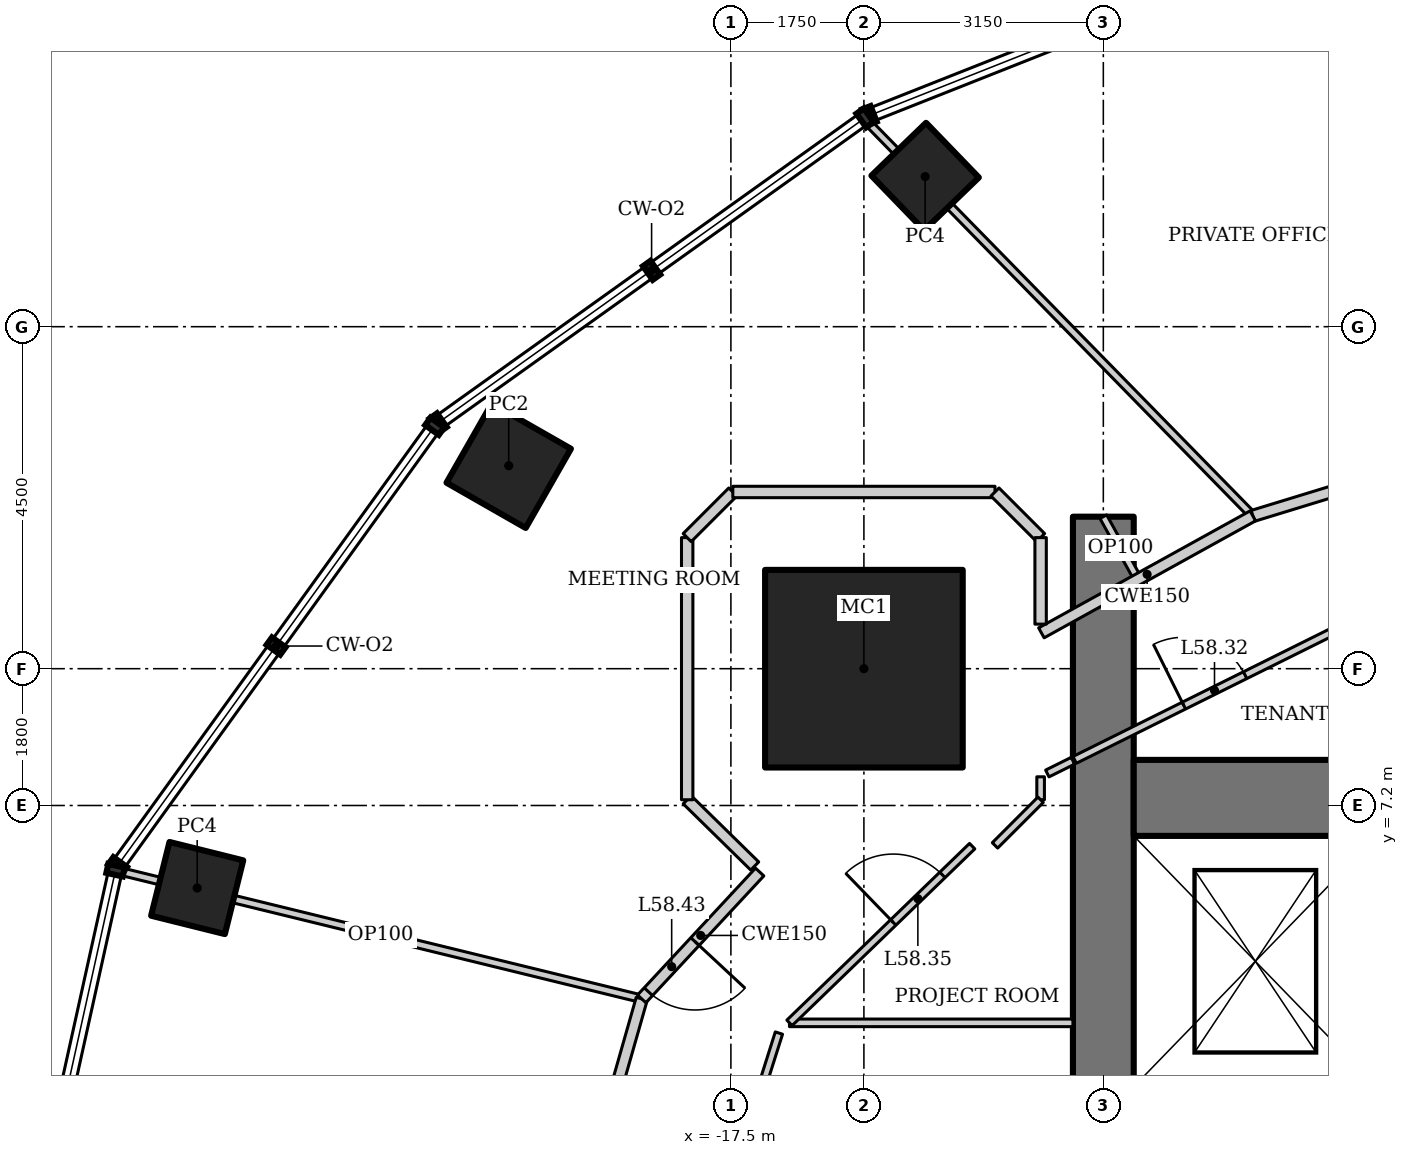
"""IFC4 building model, lengths in metres.
Left out: names, types, materials, properties, quantities, classifications, styles, units other than length and angle.
Written with IfcOpenShell. Run it as: python <this file> out.ifc"""

import sys

from ifc_helpers import new_model, si_unit, direction, frame, frame_2d, origin, origin_2d, place, context, subcontext, project, spatial, rectangle, hollow_rectangle, extrude, element, fill, save


model = new_model("IFC4")
c1 = context("Model", 3, precision=1e-05, world=origin(), true_north=direction((0.0, 1.0)))
c2 = subcontext(c1, "Body", "Model", "MODEL_VIEW")
j1 = project(units=[si_unit("LENGTHUNIT", "METRE"), si_unit("PLANEANGLEUNIT", "RADIAN")], contexts=[c1])
p1 = place(None, origin())
s1 = spatial("IfcSite", under=j1, at=p1, CompositionType="ELEMENT")
p2 = place(p1, origin())
s2 = spatial("IfcBuilding", under=s1, at=p2, CompositionType="ELEMENT")
p3 = place(p2, frame((0.0, 0.0, 249.4)))
s3 = spatial("IfcBuildingStorey", under=s2, at=p3, CompositionType="ELEMENT", Elevation=249.4)
p4 = place(p3, frame((-15.75, 9.0, 0.0), z_axis=(0.0, 0.0, 1.0), x_axis=(1.0, 0.0, 0.0)))
e1 = element("IfcColumn", 1, at=p4, inside=s3, PredefinedType="COLUMN", context=c2, shape_type="SweptSolid", body=[
    extrude(hollow_rectangle(XDim=2.6, YDim=2.6, WallThickness=0.13, at=origin_2d()), origin(), (0.0, 0.0, 1.0), 4.2),
])
for number, where, z_axis, x_axis in (
    (2, (-9.035, 17.731, 0.0), (0.0, 0.0, 1.0), (0.891, 0.454, 0.0)),
    (3, (-14.944, 15.475, 0.0), (0.0, 0.0, 1.0), (0.719, 0.695, 0.0)),
):
    element("IfcColumn", number, at=place(p3, frame(where, z_axis=z_axis, x_axis=x_axis)), inside=s3, PredefinedType="COLUMN", context=c2, shape_type="SweptSolid", body=[
        extrude(hollow_rectangle(XDim=1.0, YDim=1.0, WallThickness=0.08, at=origin_2d()), origin(), (0.0, 0.0, 1.0), 4.2),
    ])
p5 = place(p3, frame((-20.423, 11.67, 0.0), z_axis=(0.0, 0.0, 1.0), x_axis=(0.496139221777, 0.86824298017, 0.0)))
e4 = element("IfcColumn", 4, at=p5, inside=s3, PredefinedType="COLUMN", context=c2, shape_type="SweptSolid", body=[
    extrude(hollow_rectangle(XDim=1.2, YDim=1.2, WallThickness=0.1, at=origin_2d()), origin(), (0.0, 0.0, 1.0), 4.2),
])
p6 = place(p3, frame((-24.522, 6.114, 0.0), z_axis=(0.0, 0.0, 1.0), x_axis=(0.2419218956, 0.970295726276, 0.0)))
e5 = element("IfcColumn", 5, at=p6, inside=s3, PredefinedType="COLUMN", context=c2, shape_type="SweptSolid", body=[
    extrude(hollow_rectangle(XDim=1.0, YDim=1.0, WallThickness=0.08, at=origin_2d()), origin(), (0.0, 0.0, 1.0), 4.2),
])
p7 = place(p3, frame((-12.6, 11.0, 0.0), z_axis=(0.0, 0.0, 1.0), x_axis=(0.0, -1.0, 0.0)))
e6 = element("IfcWall", 6, at=p7, inside=s3, PredefinedType="SHEAR", context=c2, shape_type="SweptSolid", body=[
    extrude(rectangle(XDim=22.0, YDim=0.8, at=frame_2d((11.0, 0.0))), origin(), (0.0, 0.0, 1.0), 4.2),
])
p8 = place(p7, frame((10.1, 0.0, 0.0)))
e7 = element("IfcOpeningElement", 7, at=p8, cuts=e6, PredefinedType="OPENING", context=c2, shape_type="SweptSolid", body=[
    extrude(rectangle(XDim=1.8, YDim=2.1, at=frame_2d((0.9, 1.05))), frame((0.0, 0.41, 0.0), z_axis=(0.0, -1.0, 0.0), x_axis=(1.0, 0.0, 0.0)), (0.0, 0.0, 1.0), 0.82),
])
p9 = place(p3, frame((-5.6, 7.3, 0.0), z_axis=(0.0, 0.0, 1.0), x_axis=(-1.0, 0.0, 0.0)))
e8 = element("IfcWall", 8, at=p9, inside=s3, PredefinedType="SHEAR", context=c2, shape_type="SweptSolid", body=[
    extrude(rectangle(XDim=6.6, YDim=1.0, at=frame_2d((3.3, 0.0))), origin(), (0.0, 0.0, 1.0), 4.2),
])
p10 = place(p3, frame((-15.709, 16.199, 0.0), z_axis=(0.0, 0.0, 1.0), x_axis=(0.699362525935, -0.714767135029, 0.0)))
e9 = element("IfcWall", 9, at=p10, inside=s3, PredefinedType="PARTITIONING", context=c2, shape_type="SweptSolid", body=[
    extrude(rectangle(XDim=7.259, YDim=0.1, at=frame_2d((3.629, 0.0))), origin(), (0.0, 0.0, 1.0), 3.41),
])
p11 = place(p3, frame((-25.543, 6.335, 0.0), z_axis=(0.0, 0.0, 1.0), x_axis=(0.971384494438, -0.237512450129, 0.0)))
e10 = element("IfcWall", 10, at=p11, inside=s3, PredefinedType="PARTITIONING", context=c2, shape_type="SweptSolid", body=[
    extrude(rectangle(XDim=7.072, YDim=0.1, at=frame_2d((3.536, 0.0))), origin(), (0.0, 0.0, 1.0), 3.108),
])
p12 = place(p3, frame((-6.288, 12.341, 0.0), z_axis=(0.0, 0.0, 1.0), x_axis=(-0.956185837153, -0.292760388079, 0.0)))
e11 = element("IfcWall", 11, at=p12, inside=s3, PredefinedType="PARTITIONING", context=c2, shape_type="SweptSolid", body=[
    extrude(rectangle(XDim=4.544, YDim=0.15, at=frame_2d((2.272, 0.0))), origin(), (0.0, 0.0, 1.0), 4.05),
])
p13 = place(p12, frame((0.15, 0.0, 0.0)))
e12 = element("IfcOpeningElement", 12, at=p13, cuts=e11, PredefinedType="OPENING", context=c2, shape_type="SweptSolid", body=[
    extrude(rectangle(XDim=0.9, YDim=2.1, at=frame_2d((0.45, 1.05))), frame((0.0, 0.085, 0.0), z_axis=(0.0, -1.0, 0.0), x_axis=(1.0, 0.0, 0.0)), (0.0, 0.0, 1.0), 0.17),
])
p14 = place(p3, frame((-12.977, 7.8, 0.0), z_axis=(0.0, 0.0, 1.0), x_axis=(0.895529831139, 0.445001484874, 0.0)))
e13 = element("IfcWall", 13, at=p14, inside=s3, PredefinedType="PARTITIONING", context=c2, shape_type="SweptSolid", body=[
    extrude(rectangle(XDim=4.108, YDim=0.1, at=frame_2d((2.054, 0.0))), origin(), (0.0, 0.0, 1.0), 4.05),
])
p15 = place(p14, frame((1.604, 0.0, 0.0)))
e14 = element("IfcOpeningElement", 14, at=p15, cuts=e13, PredefinedType="OPENING", context=c2, shape_type="SweptSolid", body=[
    extrude(rectangle(XDim=0.9, YDim=2.1, at=frame_2d((0.45, 1.05))), frame((0.0, 0.06, 0.0), z_axis=(0.0, -1.0, 0.0), x_axis=(1.0, 0.0, 0.0)), (0.0, 0.0, 1.0), 0.12),
])
p16 = place(p3, frame((-16.729, 4.34, 0.0), z_axis=(0.0, 0.0, 1.0), x_axis=(1.0, 0.0, 0.0)))
e15 = element("IfcWall", 15, at=p16, inside=s3, PredefinedType="PARTITIONING", context=c2, shape_type="SweptSolid", body=[
    extrude(rectangle(XDim=3.729, YDim=0.1, at=frame_2d((1.865, 0.0))), origin(), (0.0, 0.0, 1.0), 4.05),
])
p17 = place(p3, frame((-13.337, 7.621, 0.0), z_axis=(0.0, 0.0, 1.0), x_axis=(0.895721570004, 0.444615416995, 0.0)))
e16 = element("IfcWall", 16, at=p17, inside=s3, PredefinedType="PARTITIONING", context=c2, shape_type="SweptSolid", body=[
    extrude(rectangle(XDim=0.376, YDim=0.1, at=frame_2d((0.188, 0.0))), origin(), (0.0, 0.0, 1.0), 4.05),
])
p18 = place(p3, frame((-12.6, 11.0, 0.0), z_axis=(0.0, 0.0, 1.0), x_axis=(0.484103558985, -0.875010710893, 0.0)))
e17 = element("IfcWall", 17, at=p18, inside=s3, PredefinedType="PARTITIONING", context=c2, shape_type="SweptSolid", body=[
    extrude(rectangle(XDim=0.943, YDim=0.1, at=frame_2d((0.472, 0.0))), origin(), (0.0, 0.0, 1.0), 4.05),
])
p19 = place(p3, frame((-18.673, 4.656, 0.0), z_axis=(0.0, 0.0, 1.0), x_axis=(-0.274067949327, -0.961710330168, 0.0)))
e18 = element("IfcWall", 18, at=p19, inside=s3, PredefinedType="PARTITIONING", context=c2, shape_type="SweptSolid", body=[
    extrude(rectangle(XDim=2.567, YDim=0.15, at=frame_2d((1.284, 0.0))), origin(), (0.0, 0.0, 1.0), 4.05),
])
p20 = place(p3, frame((-17.46, 2.335, 0.0), z_axis=(0.0, 0.0, 1.0), x_axis=(0.301821975729, 0.953364303384, 0.0)))
e19 = element("IfcWall", 19, at=p20, inside=s3, PredefinedType="PARTITIONING", context=c2, shape_type="SweptSolid", body=[
    extrude(rectangle(XDim=1.962, YDim=0.1, at=frame_2d((0.981, 0.0))), origin(), (0.0, 0.0, 1.0), 4.05),
])
p21 = place(p3, frame((-10.633, 11.01, 0.0), z_axis=(0.0, 0.0, 1.0), x_axis=(-0.875072100837, -0.483992580869, 0.0)))
e20 = element("IfcWall", 20, at=p21, inside=s3, PredefinedType="PARTITIONING", context=c2, shape_type="SweptSolid", body=[
    extrude(rectangle(XDim=3.179, YDim=0.15, at=frame_2d((1.59, 0.0))), origin(), (0.0, 0.0, 1.0), 4.05),
])
p22 = place(p3, frame((-17.121, 6.325, 0.0), z_axis=(0.0, 0.0, 1.0), x_axis=(-0.680985069419, -0.732297299755, 0.0)))
e21 = element("IfcWall", 21, at=p22, inside=s3, PredefinedType="PARTITIONING", context=c2, shape_type="SweptSolid", body=[
    extrude(rectangle(XDim=2.279, YDim=0.15, at=frame_2d((1.14, 0.0))), origin(), (0.0, 0.0, 1.0), 4.05),
])
p23 = place(p22, frame((1.25, 0.0, 0.0)))
e22 = element("IfcOpeningElement", 22, at=p23, cuts=e21, PredefinedType="OPENING", context=c2, shape_type="SweptSolid", body=[
    extrude(rectangle(XDim=0.9, YDim=2.1, at=frame_2d((0.45, 1.05))), frame((0.0, 0.085, 0.0), z_axis=(0.0, -1.0, 0.0), x_axis=(1.0, 0.0, 0.0)), (0.0, 0.0, 1.0), 0.17),
])
p24 = place(p3, frame((-16.729, 4.34, 0.0), z_axis=(0.0, 0.0, 1.0), x_axis=(0.718798647558, 0.695218314107, 0.0)))
e23 = element("IfcWall", 23, at=p24, inside=s3, PredefinedType="PARTITIONING", context=c2, shape_type="SweptSolid", body=[
    extrude(rectangle(XDim=3.344, YDim=0.1, at=frame_2d((1.672, 0.0))), origin(), (0.0, 0.0, 1.0), 4.05),
])
p25 = place(p24, frame((1.9, 0.0, 0.0)))
e24 = element("IfcOpeningElement", 24, at=p25, cuts=e23, PredefinedType="OPENING", context=c2, shape_type="SweptSolid", body=[
    extrude(rectangle(XDim=0.9, YDim=2.1, at=frame_2d((0.45, 1.05))), frame((0.0, 0.06, 0.0), z_axis=(0.0, -1.0, 0.0), x_axis=(1.0, 0.0, 0.0)), (0.0, 0.0, 1.0), 0.12),
])
p26 = place(p3, frame((-13.425, 7.578, 0.0), z_axis=(0.0, 0.0, 1.0), x_axis=(0.0, -1.0, 0.0)))
e25 = element("IfcWall", 25, at=p26, inside=s3, PredefinedType="PARTITIONING", context=c2, shape_type="SweptSolid", body=[
    extrude(rectangle(XDim=0.302, YDim=0.1, at=frame_2d((0.151, 0.0))), origin(), (0.0, 0.0, 1.0), 4.05),
])
p27 = place(p3, frame((-13.425, 7.275, 0.0), z_axis=(0.0, 0.0, 1.0), x_axis=(-0.707106781187, -0.707106781187, 0.0)))
e26 = element("IfcWall", 26, at=p27, inside=s3, PredefinedType="PARTITIONING", context=c2, shape_type="SweptSolid", body=[
    extrude(rectangle(XDim=0.849, YDim=0.1, at=frame_2d((0.425, 0.0))), origin(), (0.0, 0.0, 1.0), 4.05),
])
p28 = place(p3, frame((-17.187, 6.404, 0.0), z_axis=(0.0, 0.0, 1.0), x_axis=(-0.713842064016, 0.700306723973, 0.0)))
e27 = element("IfcWall", 27, at=p28, inside=s3, PredefinedType="PARTITIONING", context=c2, shape_type="SweptSolid", body=[
    extrude(rectangle(XDim=1.245, YDim=0.15, at=frame_2d((0.622, 0.0))), origin(), (0.0, 0.0, 1.0), 4.05),
])
p29 = place(p3, frame((-18.075, 7.275, 0.0), z_axis=(0.0, 0.0, 1.0), x_axis=(0.0, 1.0, 0.0)))
e28 = element("IfcWall", 28, at=p29, inside=s3, PredefinedType="PARTITIONING", context=c2, shape_type="SweptSolid", body=[
    extrude(rectangle(XDim=3.449, YDim=0.15, at=frame_2d((1.725, 0.0))), origin(), (0.0, 0.0, 1.0), 3.601),
])
p30 = place(p3, frame((-18.075, 10.725, 0.0), z_axis=(0.0, 0.0, 1.0), x_axis=(0.707106781187, 0.707106781187, 0.0)))
e29 = element("IfcWall", 29, at=p30, inside=s3, PredefinedType="PARTITIONING", context=c2, shape_type="SweptSolid", body=[
    extrude(rectangle(XDim=0.849, YDim=0.15, at=frame_2d((0.425, 0.0))), origin(), (0.0, 0.0, 1.0), 4.05),
])
p31 = place(p3, frame((-17.475, 11.325, 0.0), z_axis=(0.0, 0.0, 1.0), x_axis=(1.0, 0.0, 0.0)))
e30 = element("IfcWall", 30, at=p31, inside=s3, PredefinedType="PARTITIONING", context=c2, shape_type="SweptSolid", body=[
    extrude(rectangle(XDim=3.449, YDim=0.15, at=frame_2d((1.725, 0.0))), origin(), (0.0, 0.0, 1.0), 4.05),
])
p32 = place(p3, frame((-14.025, 11.325, 0.0), z_axis=(0.0, 0.0, 1.0), x_axis=(0.707106781187, -0.707106781187, 0.0)))
e31 = element("IfcWall", 31, at=p32, inside=s3, PredefinedType="PARTITIONING", context=c2, shape_type="SweptSolid", body=[
    extrude(rectangle(XDim=0.849, YDim=0.15, at=frame_2d((0.425, 0.0))), origin(), (0.0, 0.0, 1.0), 4.05),
])
p33 = place(p3, frame((-13.425, 10.725, 0.0), z_axis=(0.0, 0.0, 1.0), x_axis=(0.0, -1.0, 0.0)))
e32 = element("IfcWall", 32, at=p33, inside=s3, PredefinedType="PARTITIONING", context=c2, shape_type="SweptSolid", body=[
    extrude(rectangle(XDim=1.138, YDim=0.15, at=frame_2d((0.569, 0.0))), origin(), (0.0, 0.0, 1.0), 4.05),
])
p34 = place(p15, origin())
e33 = element("IfcDoor", 33, at=p34, inside=s3, OperationType="SINGLE_SWING_LEFT", PredefinedType="DOOR", context=c2, shape_type="SweptSolid", body=[
    extrude(rectangle(XDim=0.9, YDim=2.1, at=frame_2d((0.45, 1.05))), frame((0.0, 0.025, 0.0), z_axis=(0.0, -1.0, 0.0), x_axis=(1.0, 0.0, 0.0)), (0.0, 0.0, 1.0), 0.05),
])
fill(e14, e33)
p35 = place(p25, origin())
e34 = element("IfcDoor", 34, at=p35, inside=s3, OperationType="SINGLE_SWING_LEFT", PredefinedType="DOOR", context=c2, shape_type="SweptSolid", body=[
    extrude(rectangle(XDim=0.9, YDim=2.1, at=frame_2d((0.45, 1.05))), frame((0.0, 0.025, 0.0), z_axis=(0.0, -1.0, 0.0), x_axis=(1.0, 0.0, 0.0)), (0.0, 0.0, 1.0), 0.05),
])
fill(e24, e34)
p36 = place(p23, origin())
e35 = element("IfcDoor", 35, at=p36, inside=s3, OperationType="SINGLE_SWING_LEFT", PredefinedType="DOOR", context=c2, shape_type="SweptSolid", body=[
    extrude(rectangle(XDim=0.9, YDim=2.1, at=frame_2d((0.45, 1.05))), frame((0.0, 0.025, 0.0), z_axis=(0.0, -1.0, 0.0), x_axis=(1.0, 0.0, 0.0)), (0.0, 0.0, 1.0), 0.05),
])
fill(e22, e35)
save(model, sys.argv[1])
